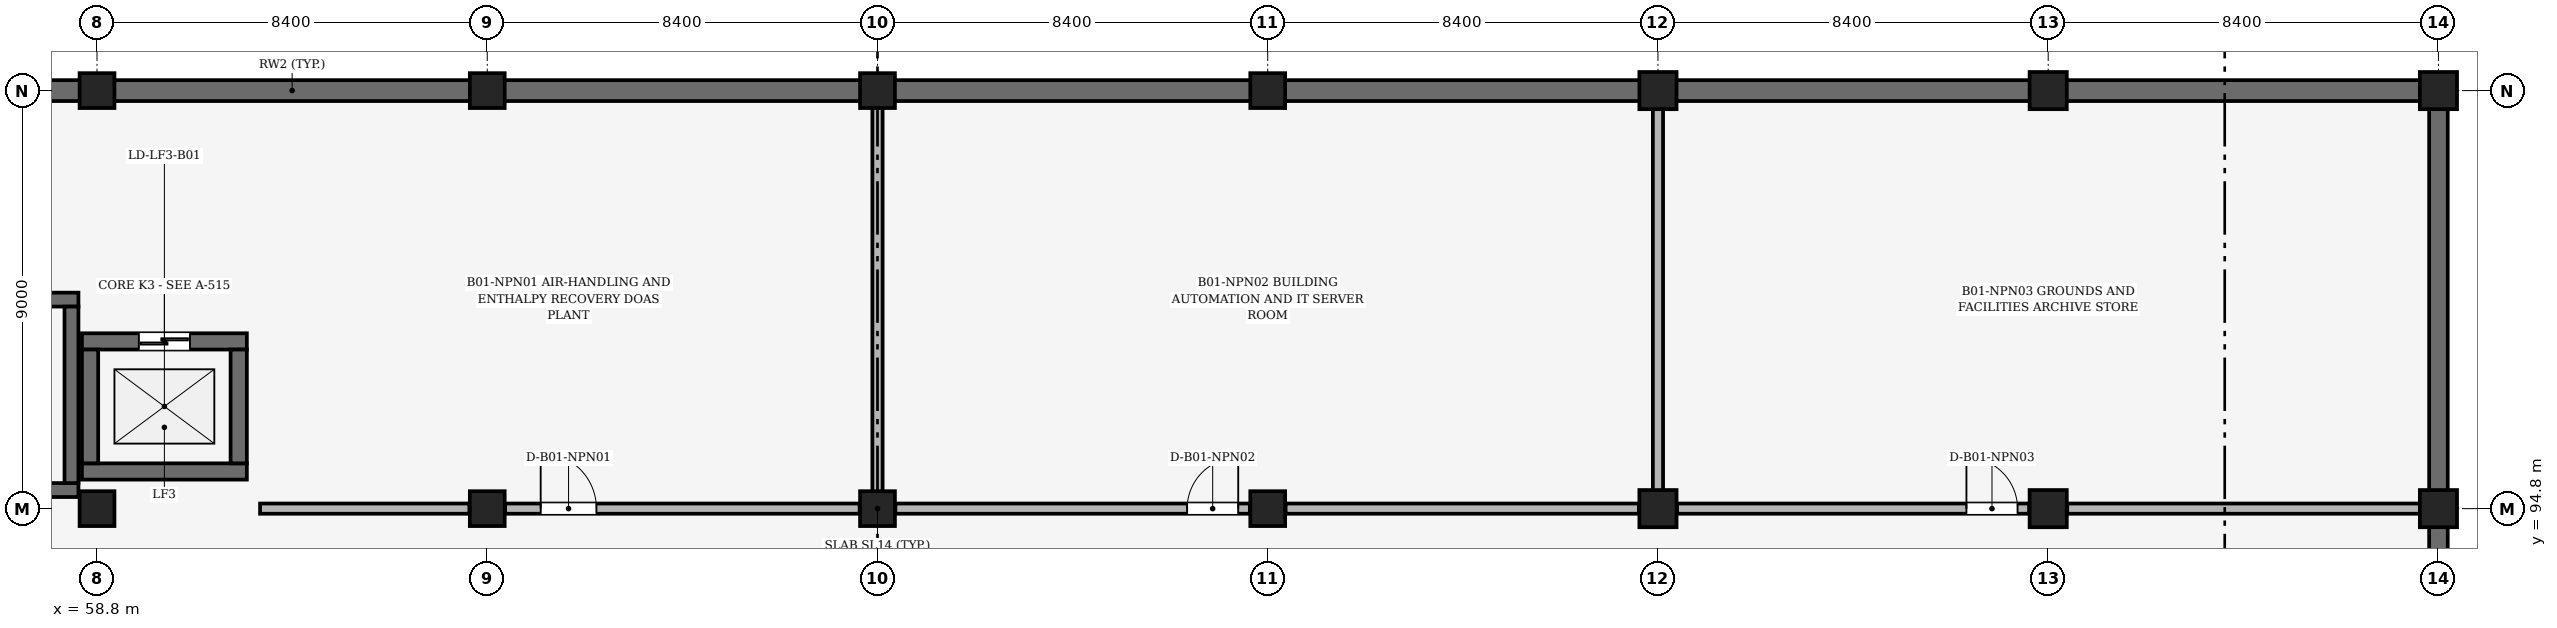
"""IFC4 building model, lengths in metres.
Left out: names, types, materials, properties, quantities, classifications, styles, units other than length and angle.
Written with IfcOpenShell. Run it as: python <this file> out.ifc"""

import sys

from ifc_helpers import new_model, si_unit, direction, frame, frame_2d, origin, origin_2d, place, context, subcontext, project, spatial, rectangle, extrude, element, fill, save


model = new_model("IFC4")
c1 = context("Model", 3, precision=1e-05, world=origin(), true_north=direction((0.0, 1.0)))
c2 = subcontext(c1, "Body", "Model", "MODEL_VIEW")
j1 = project(units=[si_unit("LENGTHUNIT", "METRE"), si_unit("PLANEANGLEUNIT", "RADIAN")], contexts=[c1])
p1 = place(None, origin())
s1 = spatial("IfcSite", under=j1, at=p1, CompositionType="ELEMENT")
p2 = place(p1, origin())
s2 = spatial("IfcBuilding", under=s1, at=p2, CompositionType="ELEMENT")
p3 = place(p2, frame((0.0, 0.0, -4.2)))
s3 = spatial("IfcBuildingStorey", under=s2, at=p3, CompositionType="ELEMENT", Elevation=-4.2)
for number, where, z_axis, x_axis in (
    (1, (58.8, 94.8, 0.0), (0.0, 0.0, 1.0), (1.0, 0.0, 0.0)),
    (2, (58.8, 103.8, 0.0), (0.0, 0.0, 1.0), (1.0, 0.0, 0.0)),
    (3, (67.2, 94.8, 0.0), (0.0, 0.0, 1.0), (1.0, 0.0, 0.0)),
    (4, (67.2, 103.8, 0.0), (0.0, 0.0, 1.0), (1.0, 0.0, 0.0)),
    (5, (75.6, 94.8, 0.0), (0.0, 0.0, 1.0), (1.0, 0.0, 0.0)),
    (6, (75.6, 103.8, 0.0), (0.0, 0.0, 1.0), (1.0, 0.0, 0.0)),
    (7, (84.0, 94.8, 0.0), (0.0, 0.0, 1.0), (1.0, 0.0, 0.0)),
    (8, (84.0, 103.8, 0.0), (0.0, 0.0, 1.0), (1.0, 0.0, 0.0)),
):
    element("IfcColumn", number, at=place(p3, frame(where, z_axis=z_axis, x_axis=x_axis)), inside=s3, PredefinedType="COLUMN", context=c2, shape_type="SweptSolid", body=[
        extrude(rectangle(XDim=0.75, YDim=0.75, at=origin_2d()), origin(), (0.0, 0.0, 1.0), 4.2),
    ])
for number, where, z_axis, x_axis in (
    (9, (92.4, 94.8, 0.0), (0.0, 0.0, 1.0), (1.0, 0.0, 0.0)),
    (10, (92.4, 103.8, 0.0), (0.0, 0.0, 1.0), (1.0, 0.0, 0.0)),
    (11, (100.8, 94.8, 0.0), (0.0, 0.0, 1.0), (1.0, 0.0, 0.0)),
    (12, (100.8, 103.8, 0.0), (0.0, 0.0, 1.0), (1.0, 0.0, 0.0)),
    (13, (109.2, 94.8, 0.0), (0.0, 0.0, 1.0), (1.0, 0.0, 0.0)),
    (14, (109.2, 103.8, 0.0), (0.0, 0.0, 1.0), (1.0, 0.0, 0.0)),
):
    element("IfcColumn", number, at=place(p3, frame(where, z_axis=z_axis, x_axis=x_axis)), inside=s3, PredefinedType="COLUMN", context=c2, shape_type="SweptSolid", body=[
        extrude(rectangle(XDim=0.8, YDim=0.8, at=origin_2d()), origin(), (0.0, 0.0, 1.0), 4.2),
    ])
p4 = place(p3, frame((109.2, 86.175, 0.0), z_axis=(0.0, 0.0, 1.0), x_axis=(0.0, 1.0, 0.0)))
e15 = element("IfcWall", 15, at=p4, inside=s3, PredefinedType="SHEAR", context=c2, shape_type="SweptSolid", body=[
    extrude(rectangle(XDim=8.25, YDim=0.4, at=frame_2d((4.125, 0.0))), origin(), (0.0, 0.0, 1.0), 2.9),
])
p5 = place(p3, frame((109.2, 95.175, 0.0), z_axis=(0.0, 0.0, 1.0), x_axis=(0.0, 1.0, 0.0)))
e16 = element("IfcWall", 16, at=p5, inside=s3, PredefinedType="SHEAR", context=c2, shape_type="SweptSolid", body=[
    extrude(rectangle(XDim=8.25, YDim=0.4, at=frame_2d((4.125, 0.0))), origin(), (0.0, 0.0, 1.0), 2.85),
])
p6 = place(p3, frame((50.75, 103.8, 0.0), z_axis=(0.0, 0.0, 1.0), x_axis=(1.0, 0.0, 0.0)))
e17 = element("IfcWall", 17, at=p6, inside=s3, PredefinedType="SHEAR", context=c2, shape_type="SweptSolid", body=[
    extrude(rectangle(XDim=7.7, YDim=0.45, at=frame_2d((3.85, 0.0))), origin(), (0.0, 0.0, 1.0), 3.15),
])
p7 = place(p3, frame((59.15, 103.8, 0.0), z_axis=(0.0, 0.0, 1.0), x_axis=(1.0, 0.0, 0.0)))
e18 = element("IfcWall", 18, at=p7, inside=s3, PredefinedType="SHEAR", context=c2, shape_type="SweptSolid", body=[
    extrude(rectangle(XDim=7.7, YDim=0.45, at=frame_2d((3.85, 0.0))), origin(), (0.0, 0.0, 1.0), 3.2),
])
p8 = place(p3, frame((67.55, 103.8, 0.0), z_axis=(0.0, 0.0, 1.0), x_axis=(1.0, 0.0, 0.0)))
e19 = element("IfcWall", 19, at=p8, inside=s3, PredefinedType="SHEAR", context=c2, shape_type="SweptSolid", body=[
    extrude(rectangle(XDim=7.7, YDim=0.45, at=frame_2d((3.85, 0.0))), origin(), (0.0, 0.0, 1.0), 3.15),
])
p9 = place(p3, frame((75.95, 103.8, 0.0), z_axis=(0.0, 0.0, 1.0), x_axis=(1.0, 0.0, 0.0)))
e20 = element("IfcWall", 20, at=p9, inside=s3, PredefinedType="SHEAR", context=c2, shape_type="SweptSolid", body=[
    extrude(rectangle(XDim=7.7, YDim=0.45, at=frame_2d((3.85, 0.0))), origin(), (0.0, 0.0, 1.0), 3.1),
])
p10 = place(p3, frame((84.35, 103.8, 0.0), z_axis=(0.0, 0.0, 1.0), x_axis=(1.0, 0.0, 0.0)))
e21 = element("IfcWall", 21, at=p10, inside=s3, PredefinedType="SHEAR", context=c2, shape_type="SweptSolid", body=[
    extrude(rectangle(XDim=7.675, YDim=0.45, at=frame_2d((3.837, 0.0))), origin(), (0.0, 0.0, 1.0), 3.05),
])
p11 = place(p3, frame((92.775, 103.8, 0.0), z_axis=(0.0, 0.0, 1.0), x_axis=(1.0, 0.0, 0.0)))
e22 = element("IfcWall", 22, at=p11, inside=s3, PredefinedType="SHEAR", context=c2, shape_type="SweptSolid", body=[
    extrude(rectangle(XDim=7.65, YDim=0.45, at=frame_2d((3.825, 0.0))), origin(), (0.0, 0.0, 1.0), 3.1),
])
p12 = place(p3, frame((101.175, 103.8, 0.0), z_axis=(0.0, 0.0, 1.0), x_axis=(1.0, 0.0, 0.0)))
e23 = element("IfcWall", 23, at=p12, inside=s3, PredefinedType="SHEAR", context=c2, shape_type="SweptSolid", body=[
    extrude(rectangle(XDim=7.65, YDim=0.45, at=frame_2d((3.825, 0.0))), origin(), (0.0, 0.0, 1.0), 3.05),
])
for number, where, z_axis, x_axis in (
    (24, (50.8, 95.2, 0.0), (0.0, 0.0, 1.0), (1.0, 0.0, 0.0)),
    (25, (50.8, 99.3, 0.0), (0.0, 0.0, 1.0), (1.0, 0.0, 0.0)),
):
    element("IfcWall", number, at=place(p3, frame(where, z_axis=z_axis, x_axis=x_axis)), inside=s3, PredefinedType="SHEAR", context=c2, shape_type="SweptSolid", body=[
        extrude(rectangle(XDim=7.6, YDim=0.3, at=frame_2d((3.8, 0.0))), origin(), (0.0, 0.0, 1.0), 4.025),
    ])
p13 = place(p3, frame((58.25, 95.35, 0.0), z_axis=(0.0, 0.0, 1.0), x_axis=(0.0, 1.0, 0.0)))
e26 = element("IfcWall", 26, at=p13, inside=s3, PredefinedType="SHEAR", context=c2, shape_type="SweptSolid", body=[
    extrude(rectangle(XDim=3.8, YDim=0.3, at=frame_2d((1.9, 0.0))), origin(), (0.0, 0.0, 1.0), 4.025),
])
p14 = place(p3, frame((58.475, 95.6, 0.0), z_axis=(0.0, 0.0, 1.0), x_axis=(1.0, 0.0, 0.0)))
e27 = element("IfcWall", 27, at=p14, inside=s3, PredefinedType="SHEAR", context=c2, shape_type="SweptSolid", body=[
    extrude(rectangle(XDim=3.55, YDim=0.35, at=frame_2d((1.775, 0.0))), origin(), (0.0, 0.0, 1.0), 3.92),
])
p15 = place(p3, frame((58.475, 98.4, 0.0), z_axis=(0.0, 0.0, 1.0), x_axis=(1.0, 0.0, 0.0)))
e28 = element("IfcWall", 28, at=p15, inside=s3, PredefinedType="SHEAR", context=c2, shape_type="SweptSolid", body=[
    extrude(rectangle(XDim=3.55, YDim=0.35, at=frame_2d((1.775, 0.0))), origin(), (0.0, 0.0, 1.0), 3.92),
])
p16 = place(p15, frame((1.225, 0.0, 0.0)))
e29 = element("IfcOpeningElement", 29, at=p16, cuts=e28, PredefinedType="OPENING", context=c2, shape_type="SweptSolid", body=[
    extrude(rectangle(XDim=1.1, YDim=2.2, at=frame_2d((0.55, 1.1))), frame((0.0, 0.185, 0.0), z_axis=(0.0, -1.0, 0.0), x_axis=(1.0, 0.0, 0.0)), (0.0, 0.0, 1.0), 0.37),
])
for number, where, z_axis, x_axis in (
    (30, (58.65, 95.775, 0.0), (0.0, 0.0, 1.0), (0.0, 1.0, 0.0)),
    (31, (61.85, 95.775, 0.0), (0.0, 0.0, 1.0), (0.0, 1.0, 0.0)),
):
    element("IfcWall", number, at=place(p3, frame(where, z_axis=z_axis, x_axis=x_axis)), inside=s3, PredefinedType="SHEAR", context=c2, shape_type="SweptSolid", body=[
        extrude(rectangle(XDim=2.45, YDim=0.35, at=frame_2d((1.225, 0.0))), origin(), (0.0, 0.0, 1.0), 3.92),
    ])
p17 = place(p3, frame((75.6, 94.915, 0.0), z_axis=(0.0, 0.0, 1.0), x_axis=(0.0, 1.0, 0.0)))
e32 = element("IfcWall", 32, at=p17, inside=s3, PredefinedType="SOLIDWALL", context=c2, shape_type="SweptSolid", body=[
    extrude(rectangle(XDim=8.655, YDim=0.22, at=frame_2d((4.328, 0.0))), origin(), (0.0, 0.0, 1.0), 2.9),
])
p18 = place(p3, frame((92.4, 94.915, 0.0), z_axis=(0.0, 0.0, 1.0), x_axis=(0.0, 1.0, 0.0)))
e33 = element("IfcWall", 33, at=p18, inside=s3, PredefinedType="SOLIDWALL", context=c2, shape_type="SweptSolid", body=[
    extrude(rectangle(XDim=8.655, YDim=0.22, at=frame_2d((4.328, 0.0))), origin(), (0.0, 0.0, 1.0), 3.05),
])
p19 = place(p3, frame((62.31, 94.8, 0.0), z_axis=(0.0, 0.0, 1.0), x_axis=(1.0, 0.0, 0.0)))
e34 = element("IfcWall", 34, at=p19, inside=s3, PredefinedType="SOLIDWALL", context=c2, shape_type="SweptSolid", body=[
    extrude(rectangle(XDim=4.505, YDim=0.22, at=frame_2d((2.252, 0.0))), origin(), (0.0, 0.0, 1.0), 2.9),
])
p20 = place(p3, frame((67.585, 94.8, 0.0), z_axis=(0.0, 0.0, 1.0), x_axis=(1.0, 0.0, 0.0)))
e35 = element("IfcWall", 35, at=p20, inside=s3, PredefinedType="SOLIDWALL", context=c2, shape_type="SweptSolid", body=[
    extrude(rectangle(XDim=7.63, YDim=0.22, at=frame_2d((3.815, 0.0))), origin(), (0.0, 0.0, 1.0), 2.9),
])
p21 = place(p20, frame((0.765, 0.0, 0.0)))
e36 = element("IfcOpeningElement", 36, at=p21, cuts=e35, PredefinedType="OPENING", context=c2, shape_type="SweptSolid", body=[
    extrude(rectangle(XDim=1.2, YDim=2.4, at=frame_2d((0.6, 1.2))), frame((0.0, 0.12, 0.0), z_axis=(0.0, -1.0, 0.0), x_axis=(1.0, 0.0, 0.0)), (0.0, 0.0, 1.0), 0.24),
])
p22 = place(p3, frame((75.985, 94.8, 0.0), z_axis=(0.0, 0.0, 1.0), x_axis=(1.0, 0.0, 0.0)))
e37 = element("IfcWall", 37, at=p22, inside=s3, PredefinedType="SOLIDWALL", context=c2, shape_type="SweptSolid", body=[
    extrude(rectangle(XDim=7.63, YDim=0.22, at=frame_2d((3.815, 0.0))), origin(), (0.0, 0.0, 1.0), 2.85),
])
p23 = place(p22, frame((6.28, 0.0, 0.0)))
e38 = element("IfcOpeningElement", 38, at=p23, cuts=e37, PredefinedType="OPENING", context=c2, shape_type="SweptSolid", body=[
    extrude(rectangle(XDim=1.1, YDim=2.15, at=frame_2d((0.55, 1.075))), frame((0.0, 0.12, 0.0), z_axis=(0.0, -1.0, 0.0), x_axis=(1.0, 0.0, 0.0)), (0.0, 0.0, 1.0), 0.24),
])
p24 = place(p3, frame((84.385, 94.8, 0.0), z_axis=(0.0, 0.0, 1.0), x_axis=(1.0, 0.0, 0.0)))
e39 = element("IfcWall", 39, at=p24, inside=s3, PredefinedType="SOLIDWALL", context=c2, shape_type="SweptSolid", body=[
    extrude(rectangle(XDim=7.605, YDim=0.22, at=frame_2d((3.802, 0.0))), origin(), (0.0, 0.0, 1.0), 2.8),
])
p25 = place(p3, frame((92.81, 94.8, 0.0), z_axis=(0.0, 0.0, 1.0), x_axis=(1.0, 0.0, 0.0)))
e40 = element("IfcWall", 40, at=p25, inside=s3, PredefinedType="SOLIDWALL", context=c2, shape_type="SweptSolid", body=[
    extrude(rectangle(XDim=7.58, YDim=0.22, at=frame_2d((3.79, 0.0))), origin(), (0.0, 0.0, 1.0), 2.7),
])
p26 = place(p25, frame((6.23, 0.0, 0.0)))
e41 = element("IfcOpeningElement", 41, at=p26, cuts=e40, PredefinedType="OPENING", context=c2, shape_type="SweptSolid", body=[
    extrude(rectangle(XDim=1.1, YDim=2.15, at=frame_2d((0.55, 1.075))), frame((0.0, 0.12, 0.0), z_axis=(0.0, -1.0, 0.0), x_axis=(1.0, 0.0, 0.0)), (0.0, 0.0, 1.0), 0.24),
])
p27 = place(p3, frame((101.21, 94.8, 0.0), z_axis=(0.0, 0.0, 1.0), x_axis=(1.0, 0.0, 0.0)))
e42 = element("IfcWall", 42, at=p27, inside=s3, PredefinedType="SOLIDWALL", context=c2, shape_type="SweptSolid", body=[
    extrude(rectangle(XDim=7.785, YDim=0.22, at=frame_2d((3.893, 0.0))), origin(), (0.0, 0.0, 1.0), 3.25),
])
p28 = place(p16, origin())
e43 = element("IfcDoor", 43, at=p28, inside=s3, OperationType="DOUBLE_DOOR_SLIDING", PredefinedType="DOOR", context=c2, shape_type="SweptSolid", body=[
    extrude(rectangle(XDim=1.1, YDim=2.2, at=frame_2d((0.55, 1.1))), frame((0.0, 0.025, 0.0), z_axis=(0.0, -1.0, 0.0), x_axis=(1.0, 0.0, 0.0)), (0.0, 0.0, 1.0), 0.05),
])
fill(e29, e43)
p29 = place(p21, origin())
e44 = element("IfcDoor", 44, at=p29, inside=s3, OperationType="SINGLE_SWING_LEFT", PredefinedType="DOOR", context=c2, shape_type="SweptSolid", body=[
    extrude(rectangle(XDim=1.2, YDim=2.4, at=frame_2d((0.6, 1.2))), frame((0.0, 0.025, 0.0), z_axis=(0.0, -1.0, 0.0), x_axis=(1.0, 0.0, 0.0)), (0.0, 0.0, 1.0), 0.05),
])
fill(e36, e44)
p30 = place(p23, origin())
e45 = element("IfcDoor", 45, at=p30, inside=s3, OperationType="SINGLE_SWING_RIGHT", PredefinedType="DOOR", context=c2, shape_type="SweptSolid", body=[
    extrude(rectangle(XDim=1.1, YDim=2.15, at=frame_2d((0.55, 1.075))), frame((0.0, 0.025, 0.0), z_axis=(0.0, -1.0, 0.0), x_axis=(1.0, 0.0, 0.0)), (0.0, 0.0, 1.0), 0.05),
])
fill(e38, e45)
p31 = place(p26, origin())
e46 = element("IfcDoor", 46, at=p31, inside=s3, OperationType="SINGLE_SWING_LEFT", PredefinedType="DOOR", context=c2, shape_type="SweptSolid", body=[
    extrude(rectangle(XDim=1.1, YDim=2.15, at=frame_2d((0.55, 1.075))), frame((0.0, 0.025, 0.0), z_axis=(0.0, -1.0, 0.0), x_axis=(1.0, 0.0, 0.0)), (0.0, 0.0, 1.0), 0.05),
])
fill(e41, e46)
save(model, sys.argv[1])
